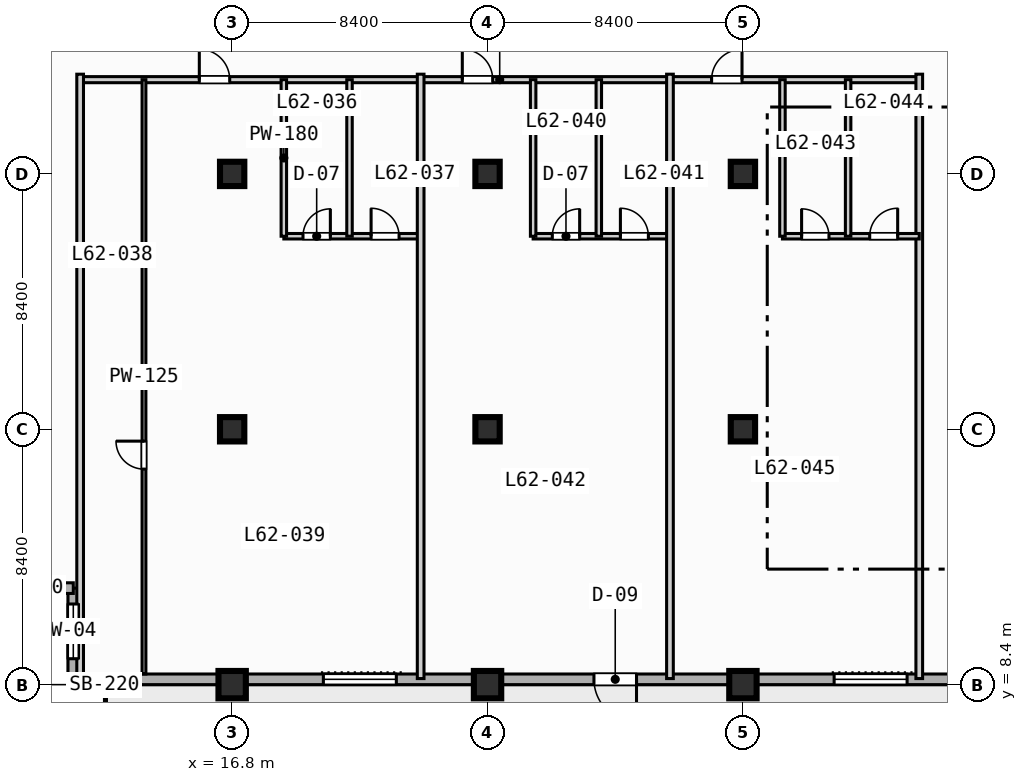
"""IFC4 building model, lengths in metres.
Left out: names, types, materials, properties, quantities, classifications, styles, units other than length and angle.
Written with IfcOpenShell. Run it as: python <this file> out.ifc"""

import sys

from ifc_helpers import new_model, si_unit, direction, frame, frame_2d, origin, origin_2d, place, context, subcontext, project, spatial, rectangle, extrude, element, fill, save


model = new_model("IFC4")
c1 = context("Model", 3, precision=1e-05, world=origin(), true_north=direction((0.0, 1.0)))
c2 = subcontext(c1, "Body", "Model", "MODEL_VIEW")
j1 = project(units=[si_unit("LENGTHUNIT", "METRE"), si_unit("PLANEANGLEUNIT", "RADIAN")], contexts=[c1])
p1 = place(None, origin())
s1 = spatial("IfcSite", under=j1, at=p1, CompositionType="ELEMENT")
p2 = place(p1, origin())
s2 = spatial("IfcBuilding", under=s1, at=p2, CompositionType="ELEMENT")
p3 = place(p2, frame((0.0, 0.0, 252.7)))
s3 = spatial("IfcBuildingStorey", under=s2, at=p3, CompositionType="ELEMENT", Elevation=252.7)
p4 = place(p3, frame((16.8, 8.4, 0.0), z_axis=(0.0, 0.0, 1.0), x_axis=(1.0, 0.0, 0.0)))
e1 = element("IfcColumn", 1, at=p4, inside=s3, PredefinedType="COLUMN", context=c2, shape_type="SweptSolid", body=[
    extrude(rectangle(XDim=0.9, YDim=0.9, at=origin_2d()), origin(), (0.0, 0.0, 1.0), 3.7),
])
for number, where, z_axis, x_axis in (
    (2, (16.8, 16.8, 0.0), (0.0, 0.0, 1.0), (1.0, 0.0, 0.0)),
    (3, (16.8, 25.2, 0.0), (0.0, 0.0, 1.0), (1.0, 0.0, 0.0)),
):
    element("IfcColumn", number, at=place(p3, frame(where, z_axis=z_axis, x_axis=x_axis)), inside=s3, PredefinedType="COLUMN", context=c2, shape_type="SweptSolid", body=[
        extrude(rectangle(XDim=0.8, YDim=0.8, at=origin_2d()), origin(), (0.0, 0.0, 1.0), 3.7),
    ])
p5 = place(p3, frame((25.2, 8.4, 0.0), z_axis=(0.0, 0.0, 1.0), x_axis=(1.0, 0.0, 0.0)))
e4 = element("IfcColumn", 4, at=p5, inside=s3, PredefinedType="COLUMN", context=c2, shape_type="SweptSolid", body=[
    extrude(rectangle(XDim=0.9, YDim=0.9, at=origin_2d()), origin(), (0.0, 0.0, 1.0), 3.7),
])
for number, where, z_axis, x_axis in (
    (5, (25.2, 16.8, 0.0), (0.0, 0.0, 1.0), (1.0, 0.0, 0.0)),
    (6, (25.2, 25.2, 0.0), (0.0, 0.0, 1.0), (1.0, 0.0, 0.0)),
):
    element("IfcColumn", number, at=place(p3, frame(where, z_axis=z_axis, x_axis=x_axis)), inside=s3, PredefinedType="COLUMN", context=c2, shape_type="SweptSolid", body=[
        extrude(rectangle(XDim=0.8, YDim=0.8, at=origin_2d()), origin(), (0.0, 0.0, 1.0), 3.7),
    ])
p6 = place(p3, frame((33.6, 8.4, 0.0), z_axis=(0.0, 0.0, 1.0), x_axis=(1.0, 0.0, 0.0)))
e7 = element("IfcColumn", 7, at=p6, inside=s3, PredefinedType="COLUMN", context=c2, shape_type="SweptSolid", body=[
    extrude(rectangle(XDim=0.9, YDim=0.9, at=origin_2d()), origin(), (0.0, 0.0, 1.0), 3.7),
])
for number, where, z_axis, x_axis in (
    (8, (33.6, 16.8, 0.0), (0.0, 0.0, 1.0), (1.0, 0.0, 0.0)),
    (9, (33.6, 25.2, 0.0), (0.0, 0.0, 1.0), (1.0, 0.0, 0.0)),
):
    element("IfcColumn", number, at=place(p3, frame(where, z_axis=z_axis, x_axis=x_axis)), inside=s3, PredefinedType="COLUMN", context=c2, shape_type="SweptSolid", body=[
        extrude(rectangle(XDim=0.8, YDim=0.8, at=origin_2d()), origin(), (0.0, 0.0, 1.0), 3.7),
    ])
p7 = place(p3, frame((11.575, 8.575, 0.0), z_axis=(0.0, 0.0, 1.0), x_axis=(0.0, 1.0, 0.0)))
e10 = element("IfcWall", 10, at=p7, inside=s3, PredefinedType="STANDARD", context=c2, shape_type="SweptSolid", body=[
    extrude(rectangle(XDim=3.0, YDim=0.35, at=frame_2d((1.5, 0.0))), origin(), (0.0, 0.0, 1.0), 3.47),
])
p8 = place(p7, frame((0.677, 0.0, 0.85)))
e11 = element("IfcOpeningElement", 11, at=p8, cuts=e10, PredefinedType="OPENING", context=c2, shape_type="SweptSolid", body=[
    extrude(rectangle(XDim=1.8, YDim=1.8, at=frame_2d((0.9, 0.9))), frame((0.0, 0.185, 0.0), z_axis=(0.0, -1.0, 0.0), x_axis=(1.0, 0.0, 0.0)), (0.0, 0.0, 1.0), 0.37),
])
p9 = place(p3, frame((11.575, 11.575, 0.0), z_axis=(0.0, 0.0, 1.0), x_axis=(-1.0, 0.0, 0.0)))
e12 = element("IfcWall", 12, at=p9, inside=s3, PredefinedType="STANDARD", context=c2, shape_type="SweptSolid", body=[
    extrude(rectangle(XDim=3.0, YDim=0.35, at=frame_2d((1.5, 0.0))), origin(), (0.0, 0.0, 1.0), 3.47),
])
p10 = place(p3, frame((72.425, 8.575, 0.0), z_axis=(0.0, 0.0, 1.0), x_axis=(-1.0, 0.0, 0.0)))
e13 = element("IfcWall", 13, at=p10, inside=s3, PredefinedType="STANDARD", context=c2, shape_type="SweptSolid", body=[
    extrude(rectangle(XDim=60.85, YDim=0.35, at=frame_2d((30.425, 0.0))), origin(), (0.0, 0.0, 1.0), 3.47),
])
p11 = place(p10, frame((42.325, 0.0, 0.0)))
e14 = element("IfcOpeningElement", 14, at=p11, cuts=e13, PredefinedType="OPENING", context=c2, shape_type="SweptSolid", body=[
    extrude(rectangle(XDim=1.4, YDim=2.2, at=frame_2d((0.7, 1.1))), frame((0.0, 0.185, 0.0), z_axis=(0.0, -1.0, 0.0), x_axis=(1.0, 0.0, 0.0)), (0.0, 0.0, 1.0), 0.37),
])
p12 = place(p10, frame((50.225, 0.0, 0.85)))
e15 = element("IfcOpeningElement", 15, at=p12, cuts=e13, PredefinedType="OPENING", context=c2, shape_type="SweptSolid", body=[
    extrude(rectangle(XDim=2.4, YDim=1.95, at=frame_2d((1.2, 0.975))), frame((0.0, 0.185, 0.0), z_axis=(0.0, -1.0, 0.0), x_axis=(1.0, 0.0, 0.0)), (0.0, 0.0, 1.0), 0.37),
])
p13 = place(p10, frame((33.425, 0.0, 0.85)))
e16 = element("IfcOpeningElement", 16, at=p13, cuts=e13, PredefinedType="OPENING", context=c2, shape_type="SweptSolid", body=[
    extrude(rectangle(XDim=2.4, YDim=1.95, at=frame_2d((1.2, 0.975))), frame((0.0, 0.185, 0.0), z_axis=(0.0, -1.0, 0.0), x_axis=(1.0, 0.0, 0.0)), (0.0, 0.0, 1.0), 0.37),
])
p14 = place(p10, frame((25.325, 0.0, 0.85)))
e17 = element("IfcOpeningElement", 17, at=p14, cuts=e13, PredefinedType="OPENING", context=c2, shape_type="SweptSolid", body=[
    extrude(rectangle(XDim=1.8, YDim=1.8, at=frame_2d((0.9, 0.9))), frame((0.0, 0.185, 0.0), z_axis=(0.0, -1.0, 0.0), x_axis=(1.0, 0.0, 0.0)), (0.0, 0.0, 1.0), 0.37),
])
p15 = place(p10, frame((58.675, 0.0, 0.85)))
e18 = element("IfcOpeningElement", 18, at=p15, cuts=e13, PredefinedType="OPENING", context=c2, shape_type="SweptSolid", body=[
    extrude(rectangle(XDim=1.8, YDim=1.8, at=frame_2d((0.9, 0.9))), frame((0.0, 0.185, 0.0), z_axis=(0.0, -1.0, 0.0), x_axis=(1.0, 0.0, 0.0)), (0.0, 0.0, 1.0), 0.37),
])
p16 = place(p3, frame((11.8, 28.3, 0.0), z_axis=(0.0, 0.0, 1.0), x_axis=(1.0, 0.0, 0.0)))
e19 = element("IfcWall", 19, at=p16, inside=s3, PredefinedType="PARTITIONING", context=c2, shape_type="SweptSolid", body=[
    extrude(rectangle(XDim=27.6, YDim=0.2, at=frame_2d((13.8, 0.0))), origin(), (0.0, 0.0, 1.0), 3.47),
])
p17 = place(p16, frame((3.92, 0.0, 0.0)))
e20 = element("IfcOpeningElement", 20, at=p17, cuts=e19, PredefinedType="OPENING", context=c2, shape_type="SweptSolid", body=[
    extrude(rectangle(XDim=1.0, YDim=2.15, at=frame_2d((0.5, 1.075))), frame((0.0, 0.11, 0.0), z_axis=(0.0, -1.0, 0.0), x_axis=(1.0, 0.0, 0.0)), (0.0, 0.0, 1.0), 0.22),
])
p18 = place(p16, frame((12.57, 0.0, 0.0)))
e21 = element("IfcOpeningElement", 21, at=p18, cuts=e19, PredefinedType="OPENING", context=c2, shape_type="SweptSolid", body=[
    extrude(rectangle(XDim=1.0, YDim=2.15, at=frame_2d((0.5, 1.075))), frame((0.0, 0.11, 0.0), z_axis=(0.0, -1.0, 0.0), x_axis=(1.0, 0.0, 0.0)), (0.0, 0.0, 1.0), 0.22),
])
p19 = place(p16, frame((20.77, 0.0, 0.0)))
e22 = element("IfcOpeningElement", 22, at=p19, cuts=e19, PredefinedType="OPENING", context=c2, shape_type="SweptSolid", body=[
    extrude(rectangle(XDim=1.0, YDim=2.15, at=frame_2d((0.5, 1.075))), frame((0.0, 0.11, 0.0), z_axis=(0.0, -1.0, 0.0), x_axis=(1.0, 0.0, 0.0)), (0.0, 0.0, 1.0), 0.22),
])
p20 = place(p3, frame((11.8, 8.6, 0.0), z_axis=(0.0, 0.0, 1.0), x_axis=(0.0, 1.0, 0.0)))
e23 = element("IfcWall", 23, at=p20, inside=s3, PredefinedType="PARTITIONING", context=c2, shape_type="SweptSolid", body=[
    extrude(rectangle(XDim=19.88, YDim=0.22, at=frame_2d((9.94, 0.0))), origin(), (0.0, 0.0, 1.0), 3.47),
])
p21 = place(p3, frame((18.5, 23.15, 0.0), z_axis=(0.0, 0.0, 1.0), x_axis=(1.0, 0.0, 0.0)))
e24 = element("IfcWall", 24, at=p21, inside=s3, PredefinedType="PLUMBINGWALL", context=c2, shape_type="SweptSolid", body=[
    extrude(rectangle(XDim=4.5, YDim=0.18, at=frame_2d((2.25, 0.0))), origin(), (0.0, 0.0, 1.0), 3.47),
])
p22 = place(p21, frame((0.63, 0.0, 0.0)))
e25 = element("IfcOpeningElement", 25, at=p22, cuts=e24, PredefinedType="OPENING", context=c2, shape_type="SweptSolid", body=[
    extrude(rectangle(XDim=0.9, YDim=2.1, at=frame_2d((0.45, 1.05))), frame((0.0, 0.1, 0.0), z_axis=(0.0, -1.0, 0.0), x_axis=(1.0, 0.0, 0.0)), (0.0, 0.0, 1.0), 0.2),
])
p23 = place(p21, frame((2.87, 0.0, 0.0)))
e26 = element("IfcOpeningElement", 26, at=p23, cuts=e24, PredefinedType="OPENING", context=c2, shape_type="SweptSolid", body=[
    extrude(rectangle(XDim=0.92, YDim=2.1, at=frame_2d((0.46, 1.05))), frame((0.0, 0.1, 0.0), z_axis=(0.0, -1.0, 0.0), x_axis=(1.0, 0.0, 0.0)), (0.0, 0.0, 1.0), 0.2),
])
for number, where, z_axis, x_axis in (
    (27, (18.5, 23.15, 0.0), (0.0, 0.0, 1.0), (0.0, 1.0, 0.0)),
    (28, (20.66, 23.15, 0.0), (0.0, 0.0, 1.0), (0.0, 1.0, 0.0)),
):
    element("IfcWall", number, at=place(p3, frame(where, z_axis=z_axis, x_axis=x_axis)), inside=s3, PredefinedType="PLUMBINGWALL", context=c2, shape_type="SweptSolid", body=[
        extrude(rectangle(XDim=5.15, YDim=0.18, at=frame_2d((2.575, 0.0))), origin(), (0.0, 0.0, 1.0), 3.47),
    ])
p24 = place(p3, frame((13.9, 8.75, 0.0), z_axis=(0.0, 0.0, 1.0), x_axis=(0.0, 1.0, 0.0)))
e29 = element("IfcWall", 29, at=p24, inside=s3, PredefinedType="PARTITIONING", context=c2, shape_type="SweptSolid", body=[
    extrude(rectangle(XDim=19.55, YDim=0.125, at=frame_2d((9.775, 0.0))), origin(), (0.0, 0.0, 1.0), 3.47),
])
p25 = place(p24, frame((6.74, 0.0, 0.0)))
e30 = element("IfcOpeningElement", 30, at=p25, cuts=e29, PredefinedType="OPENING", context=c2, shape_type="SweptSolid", body=[
    extrude(rectangle(XDim=0.92, YDim=2.1, at=frame_2d((0.46, 1.05))), frame((0.0, 0.073, 0.0), z_axis=(0.0, -1.0, 0.0), x_axis=(1.0, 0.0, 0.0)), (0.0, 0.0, 1.0), 0.145),
])
p26 = place(p3, frame((23.0, 8.6, 0.0), z_axis=(0.0, 0.0, 1.0), x_axis=(0.0, 1.0, 0.0)))
e31 = element("IfcWall", 31, at=p26, inside=s3, PredefinedType="PARTITIONING", context=c2, shape_type="SweptSolid", body=[
    extrude(rectangle(XDim=19.88, YDim=0.22, at=frame_2d((9.94, 0.0))), origin(), (0.0, 0.0, 1.0), 3.47),
])
p27 = place(p3, frame((26.7, 23.15, 0.0), z_axis=(0.0, 0.0, 1.0), x_axis=(1.0, 0.0, 0.0)))
e32 = element("IfcWall", 32, at=p27, inside=s3, PredefinedType="PLUMBINGWALL", context=c2, shape_type="SweptSolid", body=[
    extrude(rectangle(XDim=4.5, YDim=0.18, at=frame_2d((2.25, 0.0))), origin(), (0.0, 0.0, 1.0), 3.47),
])
p28 = place(p27, frame((0.63, 0.0, 0.0)))
e33 = element("IfcOpeningElement", 33, at=p28, cuts=e32, PredefinedType="OPENING", context=c2, shape_type="SweptSolid", body=[
    extrude(rectangle(XDim=0.9, YDim=2.1, at=frame_2d((0.45, 1.05))), frame((0.0, 0.1, 0.0), z_axis=(0.0, -1.0, 0.0), x_axis=(1.0, 0.0, 0.0)), (0.0, 0.0, 1.0), 0.2),
])
p29 = place(p27, frame((2.87, 0.0, 0.0)))
e34 = element("IfcOpeningElement", 34, at=p29, cuts=e32, PredefinedType="OPENING", context=c2, shape_type="SweptSolid", body=[
    extrude(rectangle(XDim=0.92, YDim=2.1, at=frame_2d((0.46, 1.05))), frame((0.0, 0.1, 0.0), z_axis=(0.0, -1.0, 0.0), x_axis=(1.0, 0.0, 0.0)), (0.0, 0.0, 1.0), 0.2),
])
for number, where, z_axis, x_axis in (
    (35, (26.7, 23.15, 0.0), (0.0, 0.0, 1.0), (0.0, 1.0, 0.0)),
    (36, (28.86, 23.15, 0.0), (0.0, 0.0, 1.0), (0.0, 1.0, 0.0)),
):
    element("IfcWall", number, at=place(p3, frame(where, z_axis=z_axis, x_axis=x_axis)), inside=s3, PredefinedType="PLUMBINGWALL", context=c2, shape_type="SweptSolid", body=[
        extrude(rectangle(XDim=5.15, YDim=0.18, at=frame_2d((2.575, 0.0))), origin(), (0.0, 0.0, 1.0), 3.47),
    ])
for number, where, z_axis, x_axis in (
    (37, (31.2, 8.6, 0.0), (0.0, 0.0, 1.0), (0.0, 1.0, 0.0)),
    (38, (39.4, 8.6, 0.0), (0.0, 0.0, 1.0), (0.0, 1.0, 0.0)),
):
    element("IfcWall", number, at=place(p3, frame(where, z_axis=z_axis, x_axis=x_axis)), inside=s3, PredefinedType="PARTITIONING", context=c2, shape_type="SweptSolid", body=[
        extrude(rectangle(XDim=19.88, YDim=0.22, at=frame_2d((9.94, 0.0))), origin(), (0.0, 0.0, 1.0), 3.47),
    ])
p30 = place(p3, frame((34.9, 23.15, 0.0), z_axis=(0.0, 0.0, 1.0), x_axis=(1.0, 0.0, 0.0)))
e39 = element("IfcWall", 39, at=p30, inside=s3, PredefinedType="PLUMBINGWALL", context=c2, shape_type="SweptSolid", body=[
    extrude(rectangle(XDim=4.5, YDim=0.18, at=frame_2d((2.25, 0.0))), origin(), (0.0, 0.0, 1.0), 3.47),
])
p31 = place(p30, frame((0.63, 0.0, 0.0)))
e40 = element("IfcOpeningElement", 40, at=p31, cuts=e39, PredefinedType="OPENING", context=c2, shape_type="SweptSolid", body=[
    extrude(rectangle(XDim=0.9, YDim=2.1, at=frame_2d((0.45, 1.05))), frame((0.0, 0.1, 0.0), z_axis=(0.0, -1.0, 0.0), x_axis=(1.0, 0.0, 0.0)), (0.0, 0.0, 1.0), 0.2),
])
p32 = place(p30, frame((2.87, 0.0, 0.0)))
e41 = element("IfcOpeningElement", 41, at=p32, cuts=e39, PredefinedType="OPENING", context=c2, shape_type="SweptSolid", body=[
    extrude(rectangle(XDim=0.92, YDim=2.1, at=frame_2d((0.46, 1.05))), frame((0.0, 0.1, 0.0), z_axis=(0.0, -1.0, 0.0), x_axis=(1.0, 0.0, 0.0)), (0.0, 0.0, 1.0), 0.2),
])
for number, where, z_axis, x_axis in (
    (42, (34.9, 23.15, 0.0), (0.0, 0.0, 1.0), (0.0, 1.0, 0.0)),
    (43, (37.06, 23.15, 0.0), (0.0, 0.0, 1.0), (0.0, 1.0, 0.0)),
):
    element("IfcWall", number, at=place(p3, frame(where, z_axis=z_axis, x_axis=x_axis)), inside=s3, PredefinedType="PLUMBINGWALL", context=c2, shape_type="SweptSolid", body=[
        extrude(rectangle(XDim=5.15, YDim=0.18, at=frame_2d((2.575, 0.0))), origin(), (0.0, 0.0, 1.0), 3.47),
    ])
p33 = place(p8, origin())
e44 = element("IfcWindow", 44, at=p33, inside=s3, PartitioningType="SINGLE_PANEL", PredefinedType="WINDOW", context=c2, shape_type="SweptSolid", body=[
    extrude(rectangle(XDim=1.8, YDim=1.8, at=frame_2d((0.9, 0.9))), frame((0.0, 0.03, 0.0), z_axis=(0.0, -1.0, 0.0), x_axis=(1.0, 0.0, 0.0)), (0.0, 0.0, 1.0), 0.06),
])
fill(e11, e44)
p34 = place(p11, origin())
e45 = element("IfcDoor", 45, at=p34, inside=s3, OperationType="SINGLE_SWING_LEFT", PredefinedType="DOOR", context=c2, shape_type="SweptSolid", body=[
    extrude(rectangle(XDim=1.4, YDim=2.2, at=frame_2d((0.7, 1.1))), frame((0.0, 0.025, 0.0), z_axis=(0.0, -1.0, 0.0), x_axis=(1.0, 0.0, 0.0)), (0.0, 0.0, 1.0), 0.05),
])
fill(e14, e45)
p35 = place(p12, origin())
e46 = element("IfcWindow", 46, at=p35, inside=s3, PartitioningType="SINGLE_PANEL", PredefinedType="WINDOW", context=c2, shape_type="SweptSolid", body=[
    extrude(rectangle(XDim=2.4, YDim=1.95, at=frame_2d((1.2, 0.975))), frame((0.0, 0.03, 0.0), z_axis=(0.0, -1.0, 0.0), x_axis=(1.0, 0.0, 0.0)), (0.0, 0.0, 1.0), 0.06),
])
fill(e15, e46)
p36 = place(p13, origin())
e47 = element("IfcWindow", 47, at=p36, inside=s3, PartitioningType="SINGLE_PANEL", PredefinedType="WINDOW", context=c2, shape_type="SweptSolid", body=[
    extrude(rectangle(XDim=2.4, YDim=1.95, at=frame_2d((1.2, 0.975))), frame((0.0, 0.03, 0.0), z_axis=(0.0, -1.0, 0.0), x_axis=(1.0, 0.0, 0.0)), (0.0, 0.0, 1.0), 0.06),
])
fill(e16, e47)
p37 = place(p15, origin())
e48 = element("IfcWindow", 48, at=p37, inside=s3, PartitioningType="SINGLE_PANEL", PredefinedType="WINDOW", context=c2, shape_type="SweptSolid", body=[
    extrude(rectangle(XDim=1.8, YDim=1.8, at=frame_2d((0.9, 0.9))), frame((0.0, 0.03, 0.0), z_axis=(0.0, -1.0, 0.0), x_axis=(1.0, 0.0, 0.0)), (0.0, 0.0, 1.0), 0.06),
])
fill(e18, e48)
p38 = place(p17, origin())
e49 = element("IfcDoor", 49, at=p38, inside=s3, OperationType="SINGLE_SWING_LEFT", PredefinedType="DOOR", context=c2, shape_type="SweptSolid", body=[
    extrude(rectangle(XDim=1.0, YDim=2.15, at=frame_2d((0.5, 1.075))), frame((0.0, 0.025, 0.0), z_axis=(0.0, -1.0, 0.0), x_axis=(1.0, 0.0, 0.0)), (0.0, 0.0, 1.0), 0.05),
])
fill(e20, e49)
p39 = place(p18, origin())
e50 = element("IfcDoor", 50, at=p39, inside=s3, OperationType="SINGLE_SWING_LEFT", PredefinedType="DOOR", context=c2, shape_type="SweptSolid", body=[
    extrude(rectangle(XDim=1.0, YDim=2.15, at=frame_2d((0.5, 1.075))), frame((0.0, 0.025, 0.0), z_axis=(0.0, -1.0, 0.0), x_axis=(1.0, 0.0, 0.0)), (0.0, 0.0, 1.0), 0.05),
])
fill(e21, e50)
p40 = place(p19, origin())
e51 = element("IfcDoor", 51, at=p40, inside=s3, OperationType="SINGLE_SWING_RIGHT", PredefinedType="DOOR", context=c2, shape_type="SweptSolid", body=[
    extrude(rectangle(XDim=1.0, YDim=2.15, at=frame_2d((0.5, 1.075))), frame((0.0, 0.025, 0.0), z_axis=(0.0, -1.0, 0.0), x_axis=(1.0, 0.0, 0.0)), (0.0, 0.0, 1.0), 0.05),
])
fill(e22, e51)
p41 = place(p22, origin())
e52 = element("IfcDoor", 52, at=p41, inside=s3, OperationType="SINGLE_SWING_RIGHT", PredefinedType="DOOR", context=c2, shape_type="SweptSolid", body=[
    extrude(rectangle(XDim=0.9, YDim=2.1, at=frame_2d((0.45, 1.05))), frame((0.0, 0.025, 0.0), z_axis=(0.0, -1.0, 0.0), x_axis=(1.0, 0.0, 0.0)), (0.0, 0.0, 1.0), 0.05),
])
fill(e25, e52)
p42 = place(p23, origin())
e53 = element("IfcDoor", 53, at=p42, inside=s3, OperationType="SINGLE_SWING_LEFT", PredefinedType="DOOR", context=c2, shape_type="SweptSolid", body=[
    extrude(rectangle(XDim=0.92, YDim=2.1, at=frame_2d((0.46, 1.05))), frame((0.0, 0.025, 0.0), z_axis=(0.0, -1.0, 0.0), x_axis=(1.0, 0.0, 0.0)), (0.0, 0.0, 1.0), 0.05),
])
fill(e26, e53)
p43 = place(p25, origin())
e54 = element("IfcDoor", 54, at=p43, inside=s3, OperationType="SINGLE_SWING_RIGHT", PredefinedType="DOOR", context=c2, shape_type="SweptSolid", body=[
    extrude(rectangle(XDim=0.92, YDim=2.1, at=frame_2d((0.46, 1.05))), frame((0.0, 0.025, 0.0), z_axis=(0.0, -1.0, 0.0), x_axis=(1.0, 0.0, 0.0)), (0.0, 0.0, 1.0), 0.05),
])
fill(e30, e54)
p44 = place(p28, origin())
e55 = element("IfcDoor", 55, at=p44, inside=s3, OperationType="SINGLE_SWING_RIGHT", PredefinedType="DOOR", context=c2, shape_type="SweptSolid", body=[
    extrude(rectangle(XDim=0.9, YDim=2.1, at=frame_2d((0.45, 1.05))), frame((0.0, 0.025, 0.0), z_axis=(0.0, -1.0, 0.0), x_axis=(1.0, 0.0, 0.0)), (0.0, 0.0, 1.0), 0.05),
])
fill(e33, e55)
p45 = place(p29, origin())
e56 = element("IfcDoor", 56, at=p45, inside=s3, OperationType="SINGLE_SWING_LEFT", PredefinedType="DOOR", context=c2, shape_type="SweptSolid", body=[
    extrude(rectangle(XDim=0.92, YDim=2.1, at=frame_2d((0.46, 1.05))), frame((0.0, 0.025, 0.0), z_axis=(0.0, -1.0, 0.0), x_axis=(1.0, 0.0, 0.0)), (0.0, 0.0, 1.0), 0.05),
])
fill(e34, e56)
p46 = place(p31, origin())
e57 = element("IfcDoor", 57, at=p46, inside=s3, OperationType="SINGLE_SWING_LEFT", PredefinedType="DOOR", context=c2, shape_type="SweptSolid", body=[
    extrude(rectangle(XDim=0.9, YDim=2.1, at=frame_2d((0.45, 1.05))), frame((0.0, 0.025, 0.0), z_axis=(0.0, -1.0, 0.0), x_axis=(1.0, 0.0, 0.0)), (0.0, 0.0, 1.0), 0.05),
])
fill(e40, e57)
p47 = place(p32, origin())
e58 = element("IfcDoor", 58, at=p47, inside=s3, OperationType="SINGLE_SWING_RIGHT", PredefinedType="DOOR", context=c2, shape_type="SweptSolid", body=[
    extrude(rectangle(XDim=0.92, YDim=2.1, at=frame_2d((0.46, 1.05))), frame((0.0, 0.025, 0.0), z_axis=(0.0, -1.0, 0.0), x_axis=(1.0, 0.0, 0.0)), (0.0, 0.0, 1.0), 0.05),
])
fill(e41, e58)
save(model, sys.argv[1])
